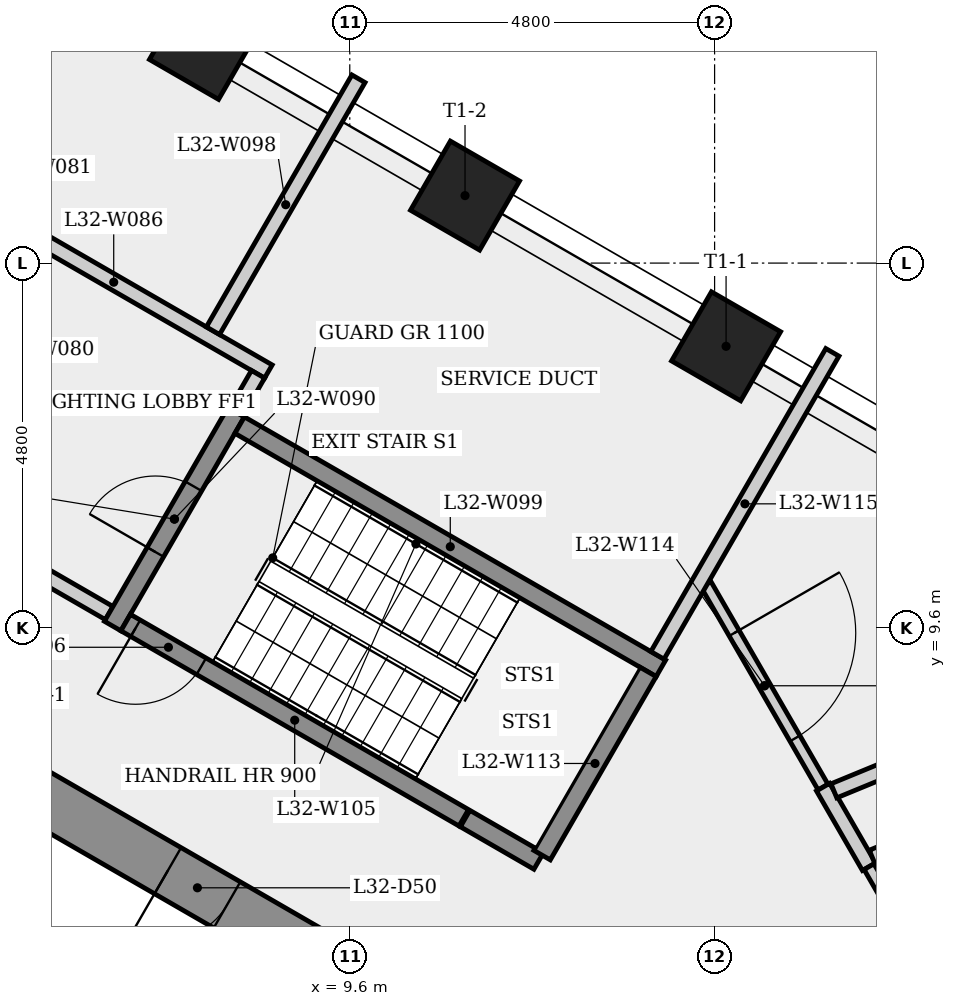
"""IFC4 building model, lengths in metres.
Left out: names, types, materials, properties, quantities, classifications, styles, units other than length and angle.
Written with IfcOpenShell. Run it as: python <this file> out.ifc"""

import sys

from ifc_helpers import new_model, si_unit, direction, frame, frame_2d, origin, origin_2d, place, context, subcontext, project, spatial, rectangle, extrude, element, fill, save


model = new_model("IFC4")
c1 = context("Model", 3, precision=1e-05, world=origin(), true_north=direction((0.0, 1.0)))
c2 = subcontext(c1, "Body", "Model", "MODEL_VIEW")
j1 = project(units=[si_unit("LENGTHUNIT", "METRE"), si_unit("PLANEANGLEUNIT", "RADIAN")], contexts=[c1])
p1 = place(None, origin())
s1 = spatial("IfcSite", under=j1, at=p1, CompositionType="ELEMENT")
p2 = place(p1, origin())
s2 = spatial("IfcBuilding", under=s1, at=p2, CompositionType="ELEMENT")
p3 = place(p2, frame((0.0, 0.0, 120.5)))
s3 = spatial("IfcBuildingStorey", under=s2, at=p3, CompositionType="ELEMENT", Elevation=120.5)
p4 = place(p3, frame((9.325, 5.182, 0.0), z_axis=(0.0, 0.0, 1.0), x_axis=(-0.866023993627, 0.500002442456, 0.0)))
e1 = element("IfcWall", 1, at=p4, inside=s3, PredefinedType="SHEAR", context=c2, shape_type="SweptSolid", body=[
    extrude(rectangle(XDim=10.97, YDim=0.7, at=frame_2d((5.485, 0.0))), origin(), (0.0, 0.0, 1.0), 4.0),
])
p5 = place(p4, frame((8.267, 0.0, 0.0)))
e2 = element("IfcOpeningElement", 2, at=p5, cuts=e1, PredefinedType="OPENING", context=c2, shape_type="SweptSolid", body=[
    extrude(rectangle(XDim=0.9, YDim=2.1, at=frame_2d((0.45, 1.05))), frame((0.0, 0.36, 0.0), z_axis=(0.0, -1.0, 0.0), x_axis=(1.0, 0.0, 0.0)), (0.0, 0.0, 1.0), 0.72),
])
p6 = place(p4, frame((1.547, 0.0, 0.0)))
e3 = element("IfcOpeningElement", 3, at=p6, cuts=e1, PredefinedType="OPENING", context=c2, shape_type="SweptSolid", body=[
    extrude(rectangle(XDim=0.9, YDim=2.1, at=frame_2d((0.45, 1.05))), frame((0.0, 0.36, 0.0), z_axis=(0.0, -1.0, 0.0), x_axis=(1.0, 0.0, 0.0)), (0.0, 0.0, 1.0), 0.72),
])
for number, where, z_axis, x_axis in (
    (4, (14.551, 13.305, 0.0), (0.0, 0.0, 1.0), (0.5, 0.866, 0.0)),
    (5, (11.116, 15.288, 0.0), (0.0, 0.0, 1.0), (0.5, 0.866, 0.0)),
    (6, (7.682, 17.271, 0.0), (0.0, 0.0, 1.0), (0.5, 0.866, 0.0)),
):
    element("IfcColumn", number, at=place(p3, frame(where, z_axis=z_axis, x_axis=x_axis)), inside=s3, PredefinedType="COLUMN", context=c2, shape_type="SweptSolid", body=[
        extrude(rectangle(XDim=1.05, YDim=1.05, at=origin_2d()), origin(), (0.0, 0.0, 1.0), 4.0),
    ])
p7 = place(p3, frame((4.459, 15.323, 0.0), z_axis=(0.0, 0.0, 1.0), x_axis=(0.866016039709, -0.500016218704, 0.0)))
e7 = element("IfcWall", 7, at=p7, inside=s3, PredefinedType="PLUMBINGWALL", context=c2, shape_type="SweptSolid", body=[
    extrude(rectangle(XDim=4.7, YDim=0.2, at=frame_2d((2.35, 0.0))), origin(), (0.0, 0.0, 1.0), 3.6),
])
p8 = place(p3, frame((6.435, 9.795, 0.0), z_axis=(0.0, 0.0, 1.0), x_axis=(-0.866012907634, 0.500021643343, 0.0)))
e8 = element("IfcWall", 8, at=p8, inside=s3, PredefinedType="PARTITIONING", context=c2, shape_type="SweptSolid", body=[
    extrude(rectangle(XDim=4.45, YDim=0.2, at=frame_2d((2.225, 0.0))), origin(), (0.0, 0.0, 1.0), 3.6),
])
p9 = place(p8, frame((1.675, 0.0, 0.0)))
e9 = element("IfcOpeningElement", 9, at=p9, cuts=e8, PredefinedType="OPENING", context=c2, shape_type="SweptSolid", body=[
    extrude(rectangle(XDim=1.1, YDim=2.1, at=frame_2d((0.55, 1.05))), frame((0.0, 0.11, 0.0), z_axis=(0.0, -1.0, 0.0), x_axis=(1.0, 0.0, 0.0)), (0.0, 0.0, 1.0), 0.22),
])
p10 = place(p3, frame((6.48, 9.624, 0.0), z_axis=(0.0, 0.0, 1.0), x_axis=(0.500017246033, 0.866015446554, 0.0)))
e10 = element("IfcWall", 10, at=p10, inside=s3, PredefinedType="SHEAR", context=c2, shape_type="SweptSolid", body=[
    extrude(rectangle(XDim=3.25, YDim=0.25, at=frame_2d((1.625, 0.0))), origin(), (0.0, 0.0, 1.0), 3.6),
])
p11 = place(p10, frame((1.125, 0.0, 0.0)))
e11 = element("IfcOpeningElement", 11, at=p11, cuts=e10, PredefinedType="OPENING", context=c2, shape_type="SweptSolid", body=[
    extrude(rectangle(XDim=1.0, YDim=2.1, at=frame_2d((0.5, 1.05))), frame((0.0, 0.135, 0.0), z_axis=(0.0, -1.0, 0.0), x_axis=(1.0, 0.0, 0.0)), (0.0, 0.0, 1.0), 0.27),
])
p12 = place(p3, frame((7.8, 13.51, 0.0), z_axis=(0.0, 0.0, 1.0), x_axis=(0.500000286673, 0.866025238274, 0.0)))
e12 = element("IfcWall", 12, at=p12, inside=s3, PredefinedType="PLUMBINGWALL", context=c2, shape_type="SweptSolid", body=[
    extrude(rectangle(XDim=3.829, YDim=0.2, at=frame_2d((1.914, 0.0))), origin(), (0.0, 0.0, 1.0), 3.6),
])
p13 = place(p3, frame((8.151, 12.268, 0.0), z_axis=(0.0, 0.0, 1.0), x_axis=(0.866025499775, -0.499999833739, 0.0)))
e13 = element("IfcWall", 13, at=p13, inside=s3, PredefinedType="SHEAR", context=c2, shape_type="SweptSolid", body=[
    extrude(rectangle(XDim=6.4, YDim=0.25, at=frame_2d((3.2, 0.0))), origin(), (0.0, 0.0, 1.0), 3.6),
])
p14 = place(p3, frame((8.393, 12.937, 0.0), z_axis=(0.0, 0.0, 1.0), x_axis=(-0.500065409566, -0.86598763626, 0.0)))
e14 = element("IfcWall", 14, at=p14, inside=s3, PredefinedType="PLUMBINGWALL", context=c2, shape_type="SweptSolid", body=[
    extrude(rectangle(XDim=0.575, YDim=0.2, at=frame_2d((0.288, 0.0))), origin(), (0.0, 0.0, 1.0), 3.6),
])
p15 = place(p3, frame((11.1, 7.101, 0.0), z_axis=(0.0, 0.0, 1.0), x_axis=(-0.8660265141, 0.499998076872, 0.0)))
e15 = element("IfcWall", 15, at=p15, inside=s3, PredefinedType="SHEAR", context=c2, shape_type="SweptSolid", body=[
    extrude(rectangle(XDim=5.137, YDim=0.25, at=frame_2d((2.569, 0.0))), origin(), (0.0, 0.0, 1.0), 3.6),
])
p16 = place(p15, frame((3.987, 0.0, 0.0)))
e16 = element("IfcOpeningElement", 16, at=p16, cuts=e15, PredefinedType="OPENING", context=c2, shape_type="SweptSolid", body=[
    extrude(rectangle(XDim=1.0, YDim=2.1, at=frame_2d((0.5, 1.05))), frame((0.0, 0.135, 0.0), z_axis=(0.0, -1.0, 0.0), x_axis=(1.0, 0.0, 0.0)), (0.0, 0.0, 1.0), 0.27),
])
p17 = place(p3, frame((12.085, 6.532, 0.0), z_axis=(0.0, 0.0, 1.0), x_axis=(-0.86604373436, 0.499968249168, 0.0)))
e17 = element("IfcWall", 17, at=p17, inside=s3, PredefinedType="SHEAR", context=c2, shape_type="SweptSolid", body=[
    extrude(rectangle(XDim=1.118, YDim=0.25, at=frame_2d((0.559, 0.0))), origin(), (0.0, 0.0, 1.0), 3.6),
])
p18 = place(p3, frame((13.523, 9.022, 0.0), z_axis=(0.0, 0.0, 1.0), x_axis=(-0.500013277472, -0.866017737897, 0.0)))
e18 = element("IfcWall", 18, at=p18, inside=s3, PredefinedType="SHEAR", context=c2, shape_type="SweptSolid", body=[
    extrude(rectangle(XDim=2.786, YDim=0.25, at=frame_2d((1.393, 0.0))), origin(), (0.0, 0.0, 1.0), 3.6),
])
p19 = place(p3, frame((14.287, 10.172, 0.0), z_axis=(0.0, 0.0, 1.0), x_axis=(0.500017452277, -0.866015327473, 0.0)))
e19 = element("IfcWall", 19, at=p19, inside=s3, PredefinedType="PARTITIONING", context=c2, shape_type="SweptSolid", body=[
    extrude(rectangle(XDim=3.081, YDim=0.15, at=frame_2d((1.54, 0.0))), origin(), (0.0, 0.0, 1.0), 3.6),
])
p20 = place(p19, frame((0.74, 0.0, 0.0)))
e20 = element("IfcOpeningElement", 20, at=p20, cuts=e19, PredefinedType="OPENING", context=c2, shape_type="SweptSolid", body=[
    extrude(rectangle(XDim=1.6, YDim=2.1, at=frame_2d((0.8, 1.05))), frame((0.0, 0.085, 0.0), z_axis=(0.0, -1.0, 0.0), x_axis=(1.0, 0.0, 0.0)), (0.0, 0.0, 1.0), 0.17),
])
p21 = place(p3, frame((13.648, 9.239, 0.0), z_axis=(0.0, 0.0, 1.0), x_axis=(0.499971870506, 0.866041643746, 0.0)))
e21 = element("IfcWall", 21, at=p21, inside=s3, PredefinedType="PLUMBINGWALL", context=c2, shape_type="SweptSolid", body=[
    extrude(rectangle(XDim=4.604, YDim=0.2, at=frame_2d((2.302, 0.0))), origin(), (0.0, 0.0, 1.0), 3.6),
])
p22 = place(p3, frame((15.827, 7.505, 0.0), z_axis=(0.0, 0.0, 1.0), x_axis=(0.500112762726, -0.865960290405, 0.0)))
e22 = element("IfcWall", 22, at=p22, inside=s3, PredefinedType="PLUMBINGWALL", context=c2, shape_type="SweptSolid", body=[
    extrude(rectangle(XDim=1.209, YDim=0.2, at=frame_2d((0.604, 0.0))), origin(), (0.0, 0.0, 1.0), 3.6),
])
p23 = place(p3, frame((15.969, 7.456, 0.0), z_axis=(0.0, 0.0, 1.0), x_axis=(0.924606037794, 0.380924762749, 0.0)))
e23 = element("IfcWall", 23, at=p23, inside=s3, PredefinedType="PLUMBINGWALL", context=c2, shape_type="SweptSolid", body=[
    extrude(rectangle(XDim=17.756, YDim=0.2, at=frame_2d((8.878, 0.0))), origin(), (0.0, 0.0, 1.0), 3.6),
])
p24 = place(p3, frame((16.431, 6.458, 0.0), z_axis=(0.0, 0.0, 1.0), x_axis=(0.49998782916, -0.866032430508, 0.0)))
e24 = element("IfcWall", 24, at=p24, inside=s3, PredefinedType="PARTITIONING", context=c2, shape_type="SweptSolid", body=[
    extrude(rectangle(XDim=1.46, YDim=0.15, at=frame_2d((0.73, 0.0))), origin(), (0.0, 0.0, 1.0), 3.6),
])
p25 = place(p3, frame((32.387, 13.138, 0.0), z_axis=(0.0, 0.0, 1.0), x_axis=(-0.924603164354, -0.380931737279, 0.0)))
e25 = element("IfcWall", 25, at=p25, inside=s3, PredefinedType="PLUMBINGWALL", context=c2, shape_type="SweptSolid", body=[
    extrude(rectangle(XDim=17.21, YDim=0.2, at=frame_2d((8.605, 0.0))), origin(), (0.0, 0.0, 1.0), 3.6),
])
p26 = place(p16, origin())
e26 = element("IfcDoor", 26, at=p26, inside=s3, OperationType="SINGLE_SWING_RIGHT", PredefinedType="DOOR", context=c2, shape_type="SweptSolid", body=[
    extrude(rectangle(XDim=1.0, YDim=2.1, at=frame_2d((0.5, 1.05))), frame((0.0, 0.025, 0.0), z_axis=(0.0, -1.0, 0.0), x_axis=(1.0, 0.0, 0.0)), (0.0, 0.0, 1.0), 0.05),
])
fill(e16, e26)
p27 = place(p11, origin())
e27 = element("IfcDoor", 27, at=p27, inside=s3, OperationType="SINGLE_SWING_LEFT", PredefinedType="DOOR", context=c2, shape_type="SweptSolid", body=[
    extrude(rectangle(XDim=1.0, YDim=2.1, at=frame_2d((0.5, 1.05))), frame((0.0, 0.025, 0.0), z_axis=(0.0, -1.0, 0.0), x_axis=(1.0, 0.0, 0.0)), (0.0, 0.0, 1.0), 0.05),
])
fill(e11, e27)
p28 = place(p20, origin())
e28 = element("IfcDoor", 28, at=p28, inside=s3, OperationType="SINGLE_SWING_LEFT", PredefinedType="DOOR", context=c2, shape_type="SweptSolid", body=[
    extrude(rectangle(XDim=1.6, YDim=2.1, at=frame_2d((0.8, 1.05))), frame((0.0, 0.025, 0.0), z_axis=(0.0, -1.0, 0.0), x_axis=(1.0, 0.0, 0.0)), (0.0, 0.0, 1.0), 0.05),
])
fill(e20, e28)
p29 = place(p6, origin())
e29 = element("IfcDoor", 29, at=p29, inside=s3, OperationType="SINGLE_SWING_RIGHT", PredefinedType="DOOR", context=c2, shape_type="SweptSolid", body=[
    extrude(rectangle(XDim=0.9, YDim=2.1, at=frame_2d((0.45, 1.05))), frame((0.0, 0.025, 0.0), z_axis=(0.0, -1.0, 0.0), x_axis=(1.0, 0.0, 0.0)), (0.0, 0.0, 1.0), 0.05),
])
fill(e3, e29)
save(model, sys.argv[1])
